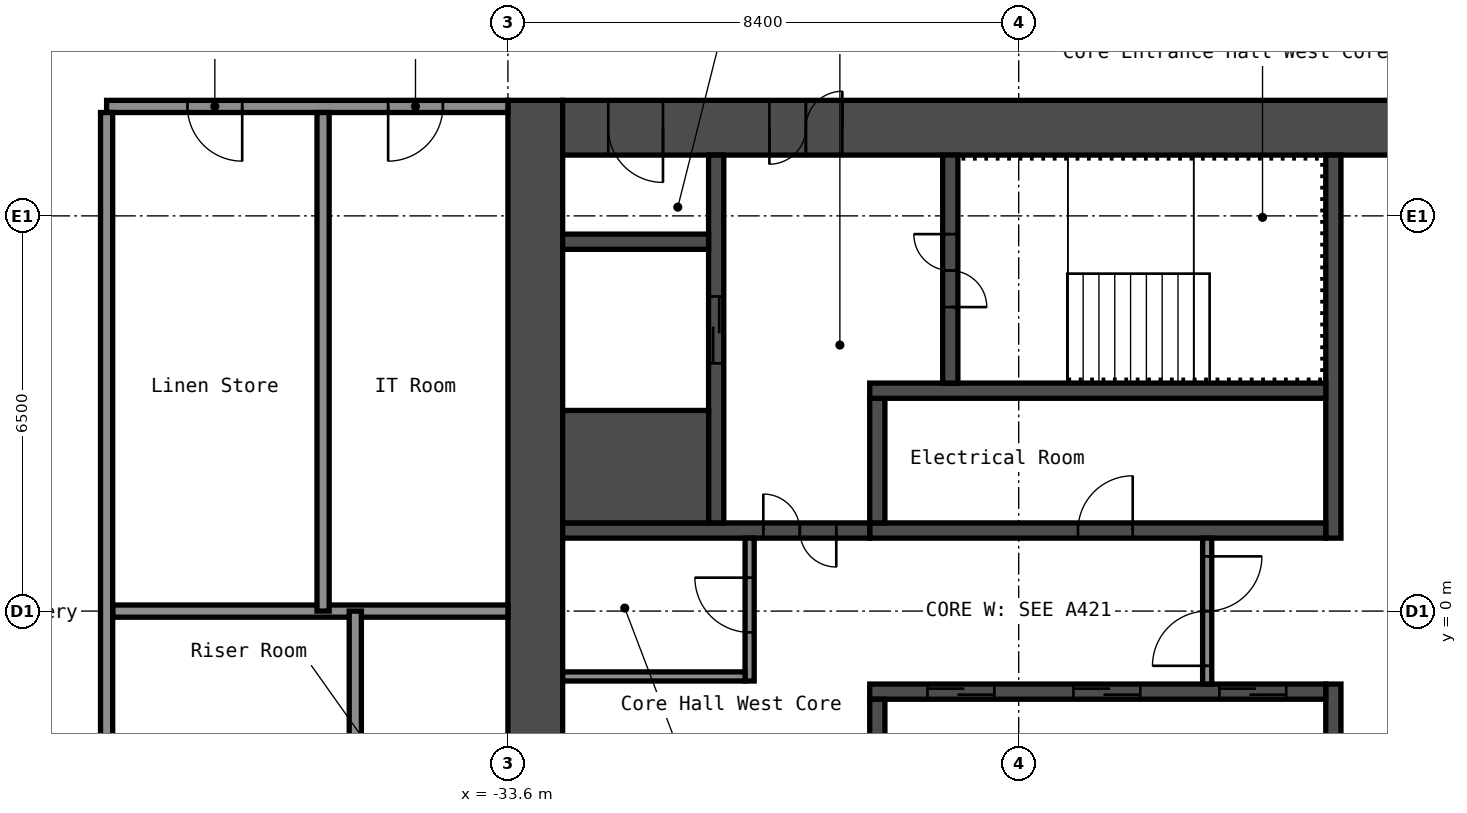
"""IFC4 building model, lengths in metres.
Left out: names, types, materials, properties, quantities, classifications, styles, units other than length and angle.
Written with IfcOpenShell. Run it as: python <this file> out.ifc"""

import sys

from ifc_helpers import new_model, si_unit, direction, frame, frame_2d, origin, place, context, subcontext, project, spatial, rectangle, extrude, element, fill, save


model = new_model("IFC4")
c1 = context("Model", 3, precision=1e-05, world=origin(), true_north=direction((0.0, 1.0)))
c2 = subcontext(c1, "Body", "Model", "MODEL_VIEW")
j1 = project(units=[si_unit("LENGTHUNIT", "METRE"), si_unit("PLANEANGLEUNIT", "RADIAN")], contexts=[c1])
p1 = place(None, origin())
s1 = spatial("IfcSite", under=j1, at=p1, CompositionType="ELEMENT")
p2 = place(p1, origin())
s2 = spatial("IfcBuilding", under=s1, at=p2, CompositionType="ELEMENT")
p3 = place(p2, frame((0.0, 0.0, 140.6)))
s3 = spatial("IfcBuildingStorey", under=s2, at=p3, CompositionType="ELEMENT", Elevation=140.6)
p4 = place(p3, frame((-33.15, -8.4, 0.0), z_axis=(0.0, 0.0, 1.0), x_axis=(0.0, 1.0, 0.0)))
e1 = element("IfcWall", 1, at=p4, inside=s3, PredefinedType="SHEAR", context=c2, shape_type="SweptSolid", body=[
    extrude(rectangle(XDim=16.8, YDim=0.9, at=frame_2d((8.4, 0.0))), origin(), (0.0, 0.0, 1.0), 2.75),
])
p5 = place(p3, frame((-32.7, 7.95, 0.0), z_axis=(0.0, 0.0, 1.0), x_axis=(1.0, 0.0, 0.0)))
e2 = element("IfcWall", 2, at=p5, inside=s3, PredefinedType="SHEAR", context=c2, shape_type="SweptSolid", body=[
    extrude(rectangle(XDim=15.0, YDim=0.9, at=frame_2d((7.5, 0.0))), origin(), (0.0, 0.0, 1.0), 2.75),
])
p6 = place(p5, frame((3.4, 0.0, 0.0)))
e3 = element("IfcOpeningElement", 3, at=p6, cuts=e2, PredefinedType="OPENING", context=c2, shape_type="SweptSolid", body=[
    extrude(rectangle(XDim=1.2, YDim=2.1, at=frame_2d((0.6, 1.05))), frame((0.0, 0.46, 0.0), z_axis=(0.0, -1.0, 0.0), x_axis=(1.0, 0.0, 0.0)), (0.0, 0.0, 1.0), 0.92),
])
p7 = place(p5, frame((0.75, 0.0, 0.0)))
e4 = element("IfcOpeningElement", 4, at=p7, cuts=e2, PredefinedType="OPENING", context=c2, shape_type="SweptSolid", body=[
    extrude(rectangle(XDim=0.9, YDim=2.1, at=frame_2d((0.45, 1.05))), frame((0.0, 0.46, 0.0), z_axis=(0.0, -1.0, 0.0), x_axis=(1.0, 0.0, 0.0)), (0.0, 0.0, 1.0), 0.92),
])
p8 = place(p3, frame((-20.025, 1.2, 0.0), z_axis=(0.0, 0.0, 1.0), x_axis=(0.0, 1.0, 0.0)))
e5 = element("IfcWall", 5, at=p8, inside=s3, PredefinedType="SHEAR", context=c2, shape_type="SweptSolid", body=[
    extrude(rectangle(XDim=6.3, YDim=0.25, at=frame_2d((3.15, 0.0))), origin(), (0.0, 0.0, 1.0), 2.75),
])
p9 = place(p3, frame((-20.025, -7.5, 0.0), z_axis=(0.0, 0.0, 1.0), x_axis=(0.0, 1.0, 0.0)))
e6 = element("IfcWall", 6, at=p9, inside=s3, PredefinedType="SHEAR", context=c2, shape_type="SweptSolid", body=[
    extrude(rectangle(XDim=6.3, YDim=0.25, at=frame_2d((3.15, 0.0))), origin(), (0.0, 0.0, 1.0), 2.75),
])
p10 = place(p9, frame((2.4, 0.0, 0.0)))
e7 = element("IfcOpeningElement", 7, at=p10, cuts=e6, PredefinedType="OPENING", context=c2, shape_type="SweptSolid", body=[
    extrude(rectangle(XDim=1.0, YDim=2.1, at=frame_2d((0.5, 1.05))), frame((0.0, 0.135, 0.0), z_axis=(0.0, -1.0, 0.0), x_axis=(1.0, 0.0, 0.0)), (0.0, 0.0, 1.0), 0.27),
])
p11 = place(p3, frame((-27.65, 1.325, 0.0), z_axis=(0.0, 0.0, 1.0), x_axis=(1.0, 0.0, 0.0)))
e8 = element("IfcWall", 8, at=p11, inside=s3, PredefinedType="SHEAR", context=c2, shape_type="SweptSolid", body=[
    extrude(rectangle(XDim=7.5, YDim=0.25, at=frame_2d((3.75, 0.0))), origin(), (0.0, 0.0, 1.0), 2.75),
])
p12 = place(p11, frame((3.425, 0.0, 0.0)))
e9 = element("IfcOpeningElement", 9, at=p12, cuts=e8, PredefinedType="OPENING", context=c2, shape_type="SweptSolid", body=[
    extrude(rectangle(XDim=0.9, YDim=2.1, at=frame_2d((0.45, 1.05))), frame((0.0, 0.135, 0.0), z_axis=(0.0, -1.0, 0.0), x_axis=(1.0, 0.0, 0.0)), (0.0, 0.0, 1.0), 0.27),
])
p13 = place(p3, frame((-27.525, 1.45, 0.0), z_axis=(0.0, 0.0, 1.0), x_axis=(0.0, 1.0, 0.0)))
e10 = element("IfcWall", 10, at=p13, inside=s3, PredefinedType="SHEAR", context=c2, shape_type="SweptSolid", body=[
    extrude(rectangle(XDim=2.05, YDim=0.25, at=frame_2d((1.025, 0.0))), origin(), (0.0, 0.0, 1.0), 2.75),
])
p14 = place(p3, frame((-27.65, 3.625, 0.0), z_axis=(0.0, 0.0, 1.0), x_axis=(1.0, 0.0, 0.0)))
e11 = element("IfcWall", 11, at=p14, inside=s3, PredefinedType="SHEAR", context=c2, shape_type="SweptSolid", body=[
    extrude(rectangle(XDim=7.5, YDim=0.25, at=frame_2d((3.75, 0.0))), origin(), (0.0, 0.0, 1.0), 2.75),
])
p15 = place(p3, frame((-26.325, 3.75, 0.0), z_axis=(0.0, 0.0, 1.0), x_axis=(0.0, 1.0, 0.0)))
e12 = element("IfcWall", 12, at=p15, inside=s3, PredefinedType="SHEAR", context=c2, shape_type="SweptSolid", body=[
    extrude(rectangle(XDim=3.75, YDim=0.25, at=frame_2d((1.875, 0.0))), origin(), (0.0, 0.0, 1.0), 2.75),
])
p16 = place(p15, frame((1.25, 0.0, 0.0)))
e13 = element("IfcOpeningElement", 13, at=p16, cuts=e12, PredefinedType="OPENING", context=c2, shape_type="SweptSolid", body=[
    extrude(rectangle(XDim=1.2, YDim=2.1, at=frame_2d((0.6, 1.05))), frame((0.0, 0.135, 0.0), z_axis=(0.0, -1.0, 0.0), x_axis=(1.0, 0.0, 0.0)), (0.0, 0.0, 1.0), 0.27),
])
p17 = place(p3, frame((-32.7, 1.325, 0.0), z_axis=(0.0, 0.0, 1.0), x_axis=(1.0, 0.0, 0.0)))
e14 = element("IfcWall", 14, at=p17, inside=s3, PredefinedType="SHEAR", context=c2, shape_type="SweptSolid", body=[
    extrude(rectangle(XDim=5.05, YDim=0.25, at=frame_2d((2.525, 0.0))), origin(), (0.0, 0.0, 1.0), 2.75),
])
p18 = place(p17, frame((3.3, 0.0, 0.0)))
e15 = element("IfcOpeningElement", 15, at=p18, cuts=e14, PredefinedType="OPENING", context=c2, shape_type="SweptSolid", body=[
    extrude(rectangle(XDim=1.2, YDim=2.1, at=frame_2d((0.6, 1.05))), frame((0.0, 0.135, 0.0), z_axis=(0.0, -1.0, 0.0), x_axis=(1.0, 0.0, 0.0)), (0.0, 0.0, 1.0), 0.27),
])
p19 = place(p3, frame((-30.175, 1.45, 0.0), z_axis=(0.0, 0.0, 1.0), x_axis=(0.0, 1.0, 0.0)))
e16 = element("IfcWall", 16, at=p19, inside=s3, PredefinedType="SHEAR", context=c2, shape_type="SweptSolid", body=[
    extrude(rectangle(XDim=6.05, YDim=0.25, at=frame_2d((3.025, 0.0))), origin(), (0.0, 0.0, 1.0), 2.75),
])
p20 = place(p19, frame((2.625, 0.0, 0.0)))
e17 = element("IfcOpeningElement", 17, at=p20, cuts=e16, PredefinedType="OPENING", context=c2, shape_type="SweptSolid", body=[
    extrude(rectangle(XDim=1.1, YDim=2.1, at=frame_2d((0.55, 1.05))), frame((0.0, 0.135, 0.0), z_axis=(0.0, -1.0, 0.0), x_axis=(1.0, 0.0, 0.0)), (0.0, 0.0, 1.0), 0.27),
])
p21 = place(p3, frame((-32.7, 2.375, 0.0), z_axis=(0.0, 0.0, 1.0), x_axis=(1.0, 0.0, 0.0)))
e18 = element("IfcWall", 18, at=p21, inside=s3, PredefinedType="SHEAR", context=c2, shape_type="SweptSolid", body=[
    extrude(rectangle(XDim=2.4, YDim=1.85, at=frame_2d((1.2, 0.0))), origin(), (0.0, 0.0, 1.0), 2.75),
])
p22 = place(p3, frame((-32.7, 6.075, 0.0), z_axis=(0.0, 0.0, 1.0), x_axis=(1.0, 0.0, 0.0)))
e19 = element("IfcWall", 19, at=p22, inside=s3, PredefinedType="SHEAR", context=c2, shape_type="SweptSolid", body=[
    extrude(rectangle(XDim=2.4, YDim=0.25, at=frame_2d((1.2, 0.0))), origin(), (0.0, 0.0, 1.0), 2.75),
])
p23 = place(p3, frame((-27.65, -1.325, 0.0), z_axis=(0.0, 0.0, 1.0), x_axis=(1.0, 0.0, 0.0)))
e20 = element("IfcWall", 20, at=p23, inside=s3, PredefinedType="SHEAR", context=c2, shape_type="SweptSolid", body=[
    extrude(rectangle(XDim=7.5, YDim=0.25, at=frame_2d((3.75, 0.0))), origin(), (0.0, 0.0, 1.0), 2.75),
])
p24 = place(p23, frame((5.75, 0.0, 0.0)))
e21 = element("IfcOpeningElement", 21, at=p24, cuts=e20, PredefinedType="OPENING", context=c2, shape_type="SweptSolid", body=[
    extrude(rectangle(XDim=1.1, YDim=2.1, at=frame_2d((0.55, 1.05))), frame((0.0, 0.135, 0.0), z_axis=(0.0, -1.0, 0.0), x_axis=(1.0, 0.0, 0.0)), (0.0, 0.0, 1.0), 0.27),
])
p25 = place(p23, frame((3.35, 0.0, 0.0)))
e22 = element("IfcOpeningElement", 22, at=p25, cuts=e20, PredefinedType="OPENING", context=c2, shape_type="SweptSolid", body=[
    extrude(rectangle(XDim=1.1, YDim=2.1, at=frame_2d((0.55, 1.05))), frame((0.0, 0.135, 0.0), z_axis=(0.0, -1.0, 0.0), x_axis=(1.0, 0.0, 0.0)), (0.0, 0.0, 1.0), 0.27),
])
p26 = place(p23, frame((0.95, 0.0, 0.0)))
e23 = element("IfcOpeningElement", 23, at=p26, cuts=e20, PredefinedType="OPENING", context=c2, shape_type="SweptSolid", body=[
    extrude(rectangle(XDim=1.1, YDim=2.1, at=frame_2d((0.55, 1.05))), frame((0.0, 0.135, 0.0), z_axis=(0.0, -1.0, 0.0), x_axis=(1.0, 0.0, 0.0)), (0.0, 0.0, 1.0), 0.27),
])
p27 = place(p3, frame((-27.525, -3.5, 0.0), z_axis=(0.0, 0.0, 1.0), x_axis=(0.0, 1.0, 0.0)))
e24 = element("IfcWall", 24, at=p27, inside=s3, PredefinedType="SHEAR", context=c2, shape_type="SweptSolid", body=[
    extrude(rectangle(XDim=2.05, YDim=0.25, at=frame_2d((1.025, 0.0))), origin(), (0.0, 0.0, 1.0), 2.75),
])
p28 = place(p3, frame((-22.1, -1.2, 0.0), z_axis=(0.0, 0.0, 1.0), x_axis=(0.0, 1.0, 0.0)))
e25 = element("IfcWall", 25, at=p28, inside=s3, PredefinedType="PARTITIONING", context=c2, shape_type="SweptSolid", body=[
    extrude(rectangle(XDim=2.4, YDim=0.15, at=frame_2d((1.2, 0.0))), origin(), (0.0, 0.0, 1.0), 2.75),
])
p29 = place(p28, frame((0.3, 0.0, 0.0)))
e26 = element("IfcOpeningElement", 26, at=p29, cuts=e25, PredefinedType="OPENING", context=c2, shape_type="SweptSolid", body=[
    extrude(rectangle(XDim=1.8, YDim=2.1, at=frame_2d((0.9, 1.05))), frame((0.0, 0.085, 0.0), z_axis=(0.0, -1.0, 0.0), x_axis=(1.0, 0.0, 0.0)), (0.0, 0.0, 1.0), 0.17),
])
p30 = place(p3, frame((-29.625, -1.15, 0.0), z_axis=(0.0, 0.0, 1.0), x_axis=(0.0, 1.0, 0.0)))
e27 = element("IfcWall", 27, at=p30, inside=s3, PredefinedType="PARTITIONING", context=c2, shape_type="SweptSolid", body=[
    extrude(rectangle(XDim=2.35, YDim=0.15, at=frame_2d((1.175, 0.0))), origin(), (0.0, 0.0, 1.0), 2.75),
])
p31 = place(p30, frame((0.8, 0.0, 0.0)))
e28 = element("IfcOpeningElement", 28, at=p31, cuts=e27, PredefinedType="OPENING", context=c2, shape_type="SweptSolid", body=[
    extrude(rectangle(XDim=0.9, YDim=2.1, at=frame_2d((0.45, 1.05))), frame((0.0, 0.085, 0.0), z_axis=(0.0, -1.0, 0.0), x_axis=(1.0, 0.0, 0.0)), (0.0, 0.0, 1.0), 0.17),
])
p32 = place(p3, frame((-32.7, -1.075, 0.0), z_axis=(0.0, 0.0, 1.0), x_axis=(1.0, 0.0, 0.0)))
e29 = element("IfcWall", 29, at=p32, inside=s3, PredefinedType="PARTITIONING", context=c2, shape_type="SweptSolid", body=[
    extrude(rectangle(XDim=3.0, YDim=0.15, at=frame_2d((1.5, 0.0))), origin(), (0.0, 0.0, 1.0), 2.75),
])
p33 = place(p3, frame((-40.1, 0.0, 0.0), z_axis=(0.0, 0.0, 1.0), x_axis=(1.0, 0.0, 0.0)))
e30 = element("IfcWall", 30, at=p33, inside=s3, PredefinedType="PARTITIONING", context=c2, shape_type="SweptSolid", body=[
    extrude(rectangle(XDim=6.5, YDim=0.2, at=frame_2d((3.25, 0.0))), origin(), (0.0, 0.0, 1.0), 2.75),
])
p34 = place(p3, frame((-40.2, 8.3, 0.0), z_axis=(0.0, 0.0, 1.0), x_axis=(1.0, 0.0, 0.0)))
e31 = element("IfcWall", 31, at=p34, inside=s3, PredefinedType="PARTITIONING", context=c2, shape_type="SweptSolid", body=[
    extrude(rectangle(XDim=6.6, YDim=0.2, at=frame_2d((3.3, 0.0))), origin(), (0.0, 0.0, 1.0), 2.75),
])
p35 = place(p34, frame((1.33, 0.0, 0.0)))
e32 = element("IfcOpeningElement", 32, at=p35, cuts=e31, PredefinedType="OPENING", context=c2, shape_type="SweptSolid", body=[
    extrude(rectangle(XDim=0.9, YDim=2.1, at=frame_2d((0.45, 1.05))), frame((0.0, 0.11, 0.0), z_axis=(0.0, -1.0, 0.0), x_axis=(1.0, 0.0, 0.0)), (0.0, 0.0, 1.0), 0.22),
])
p36 = place(p34, frame((4.63, 0.0, 0.0)))
e33 = element("IfcOpeningElement", 33, at=p36, cuts=e31, PredefinedType="OPENING", context=c2, shape_type="SweptSolid", body=[
    extrude(rectangle(XDim=0.9, YDim=2.1, at=frame_2d((0.45, 1.05))), frame((0.0, 0.11, 0.0), z_axis=(0.0, -1.0, 0.0), x_axis=(1.0, 0.0, 0.0)), (0.0, 0.0, 1.0), 0.22),
])
p37 = place(p3, frame((-40.2, -8.2, 0.0), z_axis=(0.0, 0.0, 1.0), x_axis=(0.0, 1.0, 0.0)))
e34 = element("IfcWall", 34, at=p37, inside=s3, PredefinedType="PARTITIONING", context=c2, shape_type="SweptSolid", body=[
    extrude(rectangle(XDim=16.4, YDim=0.2, at=frame_2d((8.2, 0.0))), origin(), (0.0, 0.0, 1.0), 2.75),
])
for number, where, z_axis, x_axis in (
    (35, (-36.64, 0.0, 0.0), (0.0, 0.0, 1.0), (0.0, 1.0, 0.0)),
    (36, (-36.11, -8.2, 0.0), (0.0, 0.0, 1.0), (0.0, 1.0, 0.0)),
):
    element("IfcWall", number, at=place(p3, frame(where, z_axis=z_axis, x_axis=x_axis)), inside=s3, PredefinedType="PARTITIONING", context=c2, shape_type="SweptSolid", body=[
        extrude(rectangle(XDim=8.2, YDim=0.2, at=frame_2d((4.1, 0.0))), origin(), (0.0, 0.0, 1.0), 2.75),
    ])
p38 = place(p6, origin())
e37 = element("IfcDoor", 37, at=p38, inside=s3, OperationType="DOUBLE_DOOR_SINGLE_SWING", PredefinedType="DOOR", context=c2, shape_type="SweptSolid", body=[
    extrude(rectangle(XDim=1.2, YDim=2.1, at=frame_2d((0.6, 1.05))), frame((0.0, 0.025, 0.0), z_axis=(0.0, -1.0, 0.0), x_axis=(1.0, 0.0, 0.0)), (0.0, 0.0, 1.0), 0.05),
])
fill(e3, e37)
p39 = place(p7, origin())
e38 = element("IfcDoor", 38, at=p39, inside=s3, OperationType="SINGLE_SWING_RIGHT", PredefinedType="DOOR", context=c2, shape_type="SweptSolid", body=[
    extrude(rectangle(XDim=0.9, YDim=2.1, at=frame_2d((0.45, 1.05))), frame((0.0, 0.025, 0.0), z_axis=(0.0, -1.0, 0.0), x_axis=(1.0, 0.0, 0.0)), (0.0, 0.0, 1.0), 0.05),
])
fill(e4, e38)
p40 = place(p16, origin())
e39 = element("IfcDoor", 39, at=p40, inside=s3, OperationType="DOUBLE_DOOR_SINGLE_SWING", PredefinedType="DOOR", context=c2, shape_type="SweptSolid", body=[
    extrude(rectangle(XDim=1.2, YDim=2.1, at=frame_2d((0.6, 1.05))), frame((0.0, 0.025, 0.0), z_axis=(0.0, -1.0, 0.0), x_axis=(1.0, 0.0, 0.0)), (0.0, 0.0, 1.0), 0.05),
])
fill(e13, e39)
p41 = place(p18, origin())
e40 = element("IfcDoor", 40, at=p41, inside=s3, OperationType="DOUBLE_DOOR_SINGLE_SWING", PredefinedType="DOOR", context=c2, shape_type="SweptSolid", body=[
    extrude(rectangle(XDim=1.2, YDim=2.1, at=frame_2d((0.6, 1.05))), frame((0.0, 0.025, 0.0), z_axis=(0.0, -1.0, 0.0), x_axis=(1.0, 0.0, 0.0)), (0.0, 0.0, 1.0), 0.05),
])
fill(e15, e40)
p42 = place(p29, origin())
e41 = element("IfcDoor", 41, at=p42, inside=s3, OperationType="DOUBLE_DOOR_SINGLE_SWING", PredefinedType="DOOR", context=c2, shape_type="SweptSolid", body=[
    extrude(rectangle(XDim=1.8, YDim=2.1, at=frame_2d((0.9, 1.05))), frame((0.0, 0.025, 0.0), z_axis=(0.0, -1.0, 0.0), x_axis=(1.0, 0.0, 0.0)), (0.0, 0.0, 1.0), 0.05),
])
fill(e26, e41)
p43 = place(p31, origin())
e42 = element("IfcDoor", 42, at=p43, inside=s3, OperationType="SINGLE_SWING_LEFT", PredefinedType="DOOR", context=c2, shape_type="SweptSolid", body=[
    extrude(rectangle(XDim=0.9, YDim=2.1, at=frame_2d((0.45, 1.05))), frame((0.0, 0.025, 0.0), z_axis=(0.0, -1.0, 0.0), x_axis=(1.0, 0.0, 0.0)), (0.0, 0.0, 1.0), 0.05),
])
fill(e28, e42)
p44 = place(p12, origin())
e43 = element("IfcDoor", 43, at=p44, inside=s3, OperationType="SINGLE_SWING_LEFT", PredefinedType="DOOR", context=c2, shape_type="SweptSolid", body=[
    extrude(rectangle(XDim=0.9, YDim=2.1, at=frame_2d((0.45, 1.05))), frame((0.0, 0.025, 0.0), z_axis=(0.0, -1.0, 0.0), x_axis=(1.0, 0.0, 0.0)), (0.0, 0.0, 1.0), 0.05),
])
fill(e9, e43)
p45 = place(p24, origin())
e44 = element("IfcDoor", 44, at=p45, inside=s3, OperationType="DOUBLE_DOOR_SLIDING", PredefinedType="DOOR", context=c2, shape_type="SweptSolid", body=[
    extrude(rectangle(XDim=1.1, YDim=2.1, at=frame_2d((0.55, 1.05))), frame((0.0, 0.025, 0.0), z_axis=(0.0, -1.0, 0.0), x_axis=(1.0, 0.0, 0.0)), (0.0, 0.0, 1.0), 0.05),
])
fill(e21, e44)
p46 = place(p25, origin())
e45 = element("IfcDoor", 45, at=p46, inside=s3, OperationType="DOUBLE_DOOR_SLIDING", PredefinedType="DOOR", context=c2, shape_type="SweptSolid", body=[
    extrude(rectangle(XDim=1.1, YDim=2.1, at=frame_2d((0.55, 1.05))), frame((0.0, 0.025, 0.0), z_axis=(0.0, -1.0, 0.0), x_axis=(1.0, 0.0, 0.0)), (0.0, 0.0, 1.0), 0.05),
])
fill(e22, e45)
p47 = place(p26, origin())
e46 = element("IfcDoor", 46, at=p47, inside=s3, OperationType="DOUBLE_DOOR_SLIDING", PredefinedType="DOOR", context=c2, shape_type="SweptSolid", body=[
    extrude(rectangle(XDim=1.1, YDim=2.1, at=frame_2d((0.55, 1.05))), frame((0.0, 0.025, 0.0), z_axis=(0.0, -1.0, 0.0), x_axis=(1.0, 0.0, 0.0)), (0.0, 0.0, 1.0), 0.05),
])
fill(e23, e46)
p48 = place(p20, origin())
e47 = element("IfcDoor", 47, at=p48, inside=s3, OperationType="DOUBLE_DOOR_SLIDING", PredefinedType="DOOR", context=c2, shape_type="SweptSolid", body=[
    extrude(rectangle(XDim=1.1, YDim=2.1, at=frame_2d((0.55, 1.05))), frame((0.0, 0.025, 0.0), z_axis=(0.0, -1.0, 0.0), x_axis=(1.0, 0.0, 0.0)), (0.0, 0.0, 1.0), 0.05),
])
fill(e17, e47)
p49 = place(p35, origin())
e48 = element("IfcDoor", 48, at=p49, inside=s3, OperationType="SINGLE_SWING_RIGHT", PredefinedType="DOOR", context=c2, shape_type="SweptSolid", body=[
    extrude(rectangle(XDim=0.9, YDim=2.1, at=frame_2d((0.45, 1.05))), frame((0.0, 0.025, 0.0), z_axis=(0.0, -1.0, 0.0), x_axis=(1.0, 0.0, 0.0)), (0.0, 0.0, 1.0), 0.05),
])
fill(e32, e48)
p50 = place(p36, origin())
e49 = element("IfcDoor", 49, at=p50, inside=s3, OperationType="SINGLE_SWING_LEFT", PredefinedType="DOOR", context=c2, shape_type="SweptSolid", body=[
    extrude(rectangle(XDim=0.9, YDim=2.1, at=frame_2d((0.45, 1.05))), frame((0.0, 0.025, 0.0), z_axis=(0.0, -1.0, 0.0), x_axis=(1.0, 0.0, 0.0)), (0.0, 0.0, 1.0), 0.05),
])
fill(e33, e49)
save(model, sys.argv[1])
